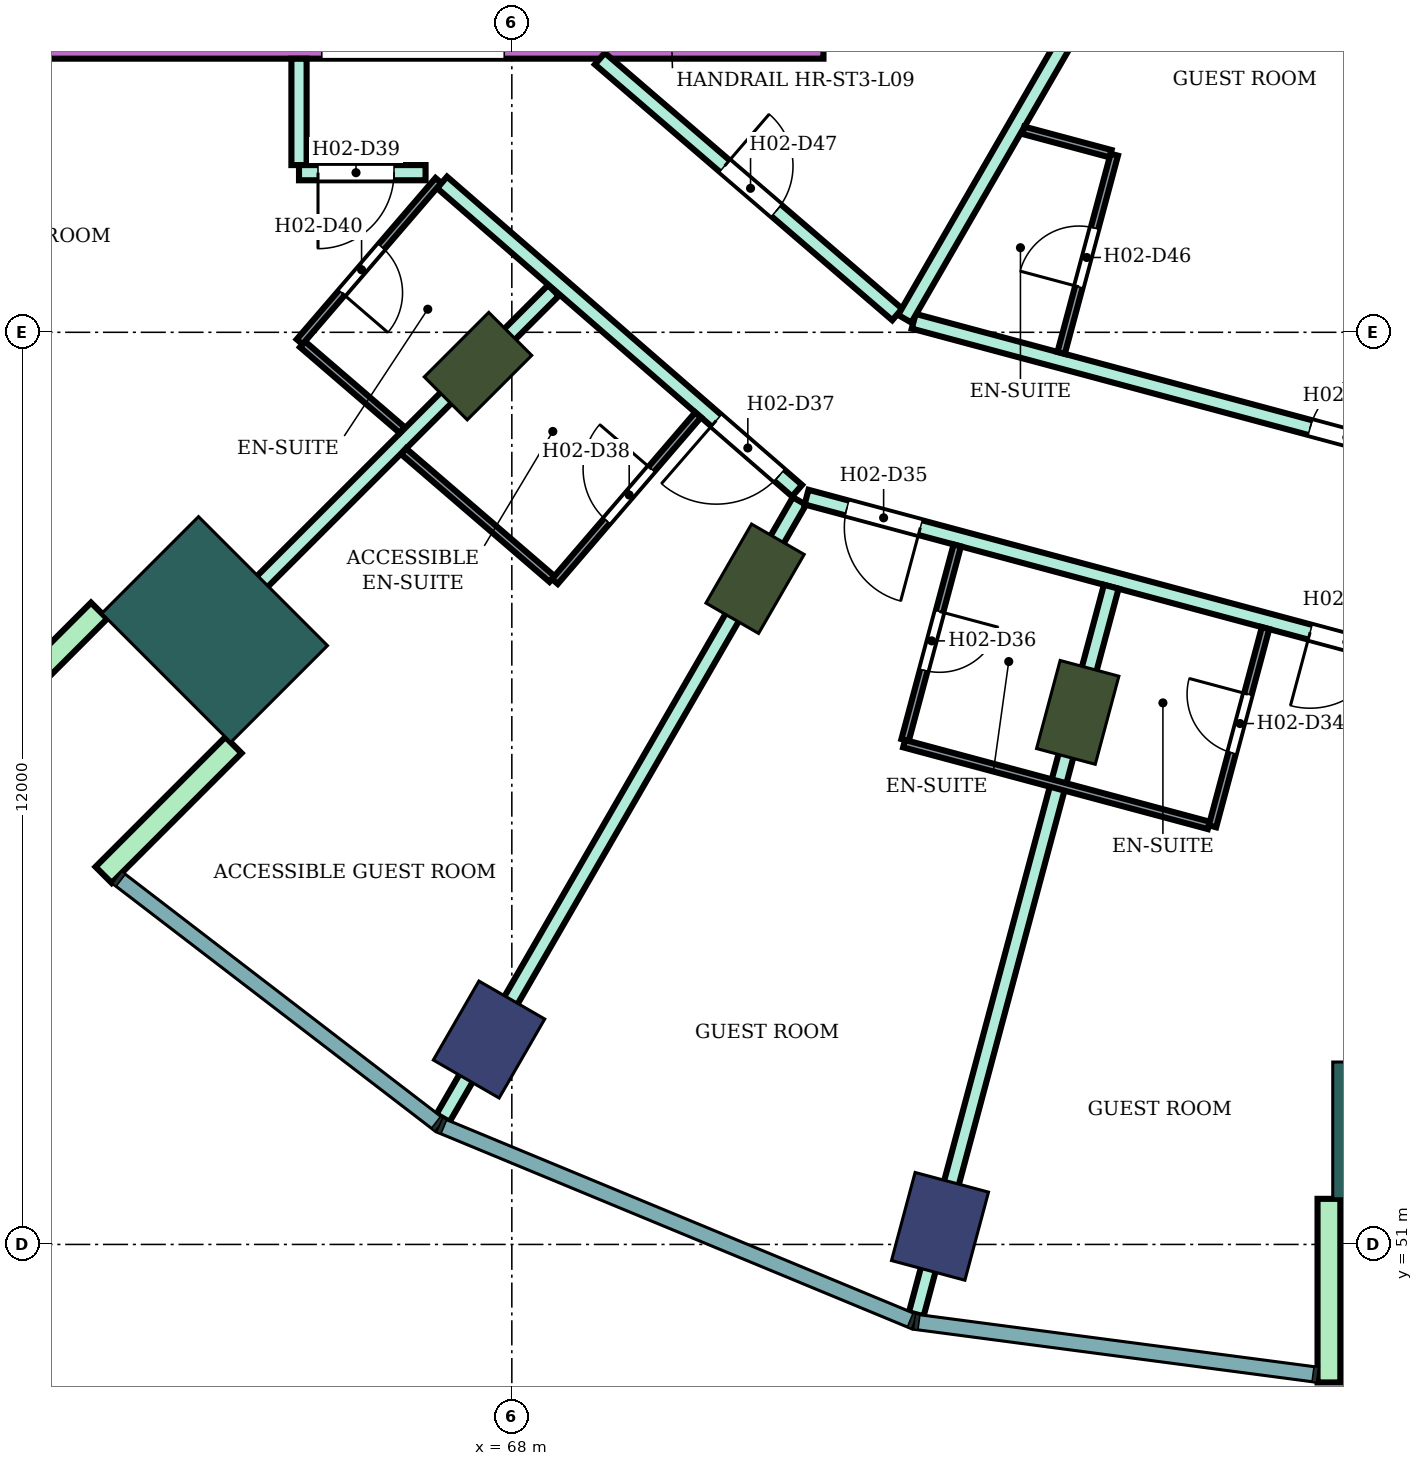
"""IFC4 building model, lengths in metres.
Left out: names, types, materials, properties, quantities, classifications, styles, units other than length and angle.
Written with IfcOpenShell. Run it as: python <this file> out.ifc"""

import sys

from ifc_helpers import new_model, si_unit, direction, frame, frame_2d, origin, origin_2d, place, context, subcontext, project, spatial, rectangle, extrude, element, fill, save


model = new_model("IFC4")
c1 = context("Model", 3, precision=1e-05, world=origin(), true_north=direction((0.0, 1.0)))
c2 = subcontext(c1, "Body", "Model", "MODEL_VIEW")
j1 = project(units=[si_unit("LENGTHUNIT", "METRE"), si_unit("PLANEANGLEUNIT", "RADIAN")], contexts=[c1])
p1 = place(None, origin())
s1 = spatial("IfcSite", under=j1, at=p1, CompositionType="ELEMENT")
p2 = place(p1, origin())
s2 = spatial("IfcBuilding", under=s1, at=p2, CompositionType="ELEMENT")
p3 = place(p2, frame((0.0, 0.0, 44.0)))
s3 = spatial("IfcBuildingStorey", under=s2, at=p3, CompositionType="ELEMENT", Elevation=44.0)
for number, where, z_axis, x_axis in (
    (1, (67.7, 53.696, 0.0), (0.0, 0.0, 1.0), (-0.5, -0.866, 0.0)),
    (2, (73.633, 51.238, 0.0), (0.0, 0.0, 1.0), (-0.259, -0.966, 0.0)),
):
    element("IfcColumn", number, at=place(p3, frame(where, z_axis=z_axis, x_axis=x_axis)), inside=s3, PredefinedType="COLUMN", context=c2, shape_type="SweptSolid", body=[
        extrude(rectangle(XDim=1.2, YDim=1.0, at=origin_2d()), origin(), (0.0, 0.0, 1.0), 3.8),
    ])
for number, where, z_axis, x_axis in (
    (3, (67.555, 62.555, 0.0), (0.0, 0.0, 1.0), (-0.707, -0.707, 0.0)),
    (4, (71.2, 59.758, 0.0), (0.0, 0.0, 1.0), (-0.5, -0.866, 0.0)),
    (5, (75.445, 58.0, 0.0), (0.0, 0.0, 1.0), (-0.259, -0.966, 0.0)),
):
    element("IfcColumn", number, at=place(p3, frame(where, z_axis=z_axis, x_axis=x_axis)), inside=s3, PredefinedType="COLUMN", context=c2, shape_type="SweptSolid", body=[
        extrude(rectangle(XDim=1.2, YDim=0.8, at=origin_2d()), origin(), (0.0, 0.0, 1.0), 3.8),
    ])
for number, where, z_axis, x_axis in (
    (6, (64.09, 59.09, 0.0), (0.0, 0.0, 1.0), (-0.707, -0.707, 0.0)),
    (7, (80.0, 52.5, 0.0), (0.0, 0.0, 1.0), (0.0, -1.0, 0.0)),
):
    element("IfcColumn", number, at=place(p3, frame(where, z_axis=z_axis, x_axis=x_axis)), inside=s3, PredefinedType="COLUMN", context=c2, shape_type="SweptSolid", body=[
        extrude(rectangle(XDim=1.8, YDim=2.4, at=origin_2d()), origin(), (0.0, 0.0, 1.0), 3.8),
    ])
p4 = place(p3, frame((72.1, 67.0, 0.0), z_axis=(0.0, 0.0, 1.0), x_axis=(-1.0, 0.0, 0.0)))
e8 = element("IfcWall", 8, at=p4, inside=s3, PredefinedType="SHEAR", context=c2, shape_type="SweptSolid", body=[
    extrude(rectangle(XDim=14.7, YDim=0.8, at=frame_2d((7.35, 0.0))), origin(), (0.0, 0.0, 1.0), 3.48),
])
p5 = place(p4, frame((4.2, 0.0, 0.0)))
e9 = element("IfcOpeningElement", 9, at=p5, cuts=e8, PredefinedType="OPENING", context=c2, shape_type="SweptSolid", body=[
    extrude(rectangle(XDim=2.4, YDim=2.4, at=frame_2d((1.2, 1.2))), frame((0.0, 0.41, 0.0), z_axis=(0.0, -1.0, 0.0), x_axis=(1.0, 0.0, 0.0)), (0.0, 0.0, 1.0), 0.82),
])
for number, where, z_axis, x_axis in (
    (10, (62.57, 59.338, 0.0), (0.0, 0.0, 1.0), (-0.707, -0.707, 0.0)),
    (11, (64.338, 57.57, 0.0), (0.0, 0.0, 1.0), (-0.707, -0.707, 0.0)),
    (12, (78.75, 51.6, 0.0), (0.0, 0.0, 1.0), (0.0, -1.0, 0.0)),
):
    element("IfcWall", number, at=place(p3, frame(where, z_axis=z_axis, x_axis=x_axis)), inside=s3, PredefinedType="NOTDEFINED", context=c2, shape_type="SweptSolid", body=[
        extrude(rectangle(XDim=2.416, YDim=0.3, at=frame_2d((1.208, 0.0))), origin(), (0.0, 0.0, 1.0), 3.8),
    ])
p6 = place(p3, frame((63.594, 58.598, 0.0), z_axis=(0.0, 0.0, 1.0), x_axis=(0.707228748718, 0.706984792613, 0.0)))
e13 = element("IfcWall", 13, at=p6, inside=s3, PredefinedType="PARTITIONING", context=c2, shape_type="SweptSolid", body=[
    extrude(rectangle(XDim=7.005, YDim=0.2, at=frame_2d((3.503, 0.0))), origin(), (0.0, 0.0, 1.0), 3.35),
])
p7 = place(p3, frame((65.2, 65.2, 0.0), z_axis=(0.0, 0.0, 1.0), x_axis=(0.0, 1.0, 0.0)))
e14 = element("IfcWall", 14, at=p7, inside=s3, PredefinedType="PARTITIONING", context=c2, shape_type="SweptSolid", body=[
    extrude(rectangle(XDim=1.399, YDim=0.2, at=frame_2d((0.7, 0.0))), origin(), (0.0, 0.0, 1.0), 3.35),
])
p8 = place(p3, frame((65.2, 65.1, 0.0), z_axis=(0.0, 0.0, 1.0), x_axis=(1.0, 0.0, 0.0)))
e15 = element("IfcWall", 15, at=p8, inside=s3, PredefinedType="PARTITIONING", context=c2, shape_type="SweptSolid", body=[
    extrude(rectangle(XDim=1.665, YDim=0.2, at=frame_2d((0.833, 0.0))), origin(), (0.0, 0.0, 1.0), 3.35),
])
p9 = place(p8, frame((0.25, 0.0, 0.0)))
e16 = element("IfcOpeningElement", 16, at=p9, cuts=e15, PredefinedType="OPENING", context=c2, shape_type="SweptSolid", body=[
    extrude(rectangle(XDim=1.0, YDim=2.1, at=frame_2d((0.5, 1.05))), frame((0.0, 0.11, 0.0), z_axis=(0.0, -1.0, 0.0), x_axis=(1.0, 0.0, 0.0)), (0.0, 0.0, 1.0), 0.22),
])
p10 = place(p3, frame((67.082, 64.972, 0.0), z_axis=(0.0, 0.0, 1.0), x_axis=(0.755033632617, -0.655686063309, 0.0)))
e17 = element("IfcWall", 17, at=p10, inside=s3, PredefinedType="PARTITIONING", context=c2, shape_type="SweptSolid", body=[
    extrude(rectangle(XDim=6.185, YDim=0.2, at=frame_2d((3.093, 0.0))), origin(), (0.0, 0.0, 1.0), 3.35),
])
p11 = place(p10, frame((4.778, 0.0, 0.0)))
e18 = element("IfcOpeningElement", 18, at=p11, cuts=e17, PredefinedType="OPENING", context=c2, shape_type="SweptSolid", body=[
    extrude(rectangle(XDim=1.1, YDim=2.1, at=frame_2d((0.55, 1.05))), frame((0.0, 0.11, 0.0), z_axis=(0.0, -1.0, 0.0), x_axis=(1.0, 0.0, 0.0)), (0.0, 0.0, 1.0), 0.22),
])
p12 = place(p3, frame((67.094, 52.663, 0.0), z_axis=(0.0, 0.0, 1.0), x_axis=(0.500216854217, 0.865900166738, 0.0)))
e19 = element("IfcWall", 19, at=p12, inside=s3, PredefinedType="PARTITIONING", context=c2, shape_type="SweptSolid", body=[
    extrude(rectangle(XDim=9.375, YDim=0.2, at=frame_2d((4.688, 0.0))), origin(), (0.0, 0.0, 1.0), 3.35),
])
p13 = place(p3, frame((69.158, 66.6, 0.0), z_axis=(0.0, 0.0, 1.0), x_axis=(0.758063092745, -0.652181222835, 0.0)))
e20 = element("IfcWall", 20, at=p13, inside=s3, PredefinedType="PARTITIONING", context=c2, shape_type="SweptSolid", body=[
    extrude(rectangle(XDim=5.16, YDim=0.2, at=frame_2d((2.58, 0.0))), origin(), (0.0, 0.0, 1.0), 3.35),
])
p14 = place(p13, frame((2.165, 0.0, 0.0)))
e21 = element("IfcOpeningElement", 21, at=p14, cuts=e20, PredefinedType="OPENING", context=c2, shape_type="SweptSolid", body=[
    extrude(rectangle(XDim=0.9, YDim=2.1, at=frame_2d((0.45, 1.05))), frame((0.0, 0.11, 0.0), z_axis=(0.0, -1.0, 0.0), x_axis=(1.0, 0.0, 0.0)), (0.0, 0.0, 1.0), 0.22),
])
p15 = place(p3, frame((71.877, 60.832, 0.0), z_axis=(0.0, 0.0, 1.0), x_axis=(0.965852509869, -0.259092510851, 0.0)))
e22 = element("IfcWall", 22, at=p15, inside=s3, PredefinedType="PARTITIONING", context=c2, shape_type="SweptSolid", body=[
    extrude(rectangle(XDim=8.32, YDim=0.2, at=frame_2d((4.16, 0.0))), origin(), (0.0, 0.0, 1.0), 3.35),
])
p16 = place(p15, frame((6.86, 0.0, 0.0)))
e23 = element("IfcOpeningElement", 23, at=p16, cuts=e22, PredefinedType="OPENING", context=c2, shape_type="SweptSolid", body=[
    extrude(rectangle(XDim=1.0, YDim=2.1, at=frame_2d((0.5, 1.05))), frame((0.0, 0.11, 0.0), z_axis=(0.0, -1.0, 0.0), x_axis=(1.0, 0.0, 0.0)), (0.0, 0.0, 1.0), 0.22),
])
p17 = place(p15, frame((0.55, 0.0, 0.0)))
e24 = element("IfcOpeningElement", 24, at=p17, cuts=e22, PredefinedType="OPENING", context=c2, shape_type="SweptSolid", body=[
    extrude(rectangle(XDim=1.0, YDim=2.1, at=frame_2d((0.5, 1.05))), frame((0.0, 0.11, 0.0), z_axis=(0.0, -1.0, 0.0), x_axis=(1.0, 0.0, 0.0)), (0.0, 0.0, 1.0), 0.22),
])
p18 = place(p3, frame((73.287, 63.145, 0.0), z_axis=(0.0, 0.0, 1.0), x_axis=(0.965854200194, -0.259086209526, 0.0)))
e25 = element("IfcWall", 25, at=p18, inside=s3, PredefinedType="PARTITIONING", context=c2, shape_type="SweptSolid", body=[
    extrude(rectangle(XDim=6.82, YDim=0.2, at=frame_2d((3.41, 0.0))), origin(), (0.0, 0.0, 1.0), 3.35),
])
p19 = place(p18, frame((5.4, 0.0, 0.0)))
e26 = element("IfcOpeningElement", 26, at=p19, cuts=e25, PredefinedType="OPENING", context=c2, shape_type="SweptSolid", body=[
    extrude(rectangle(XDim=1.0, YDim=2.1, at=frame_2d((0.5, 1.05))), frame((0.0, 0.11, 0.0), z_axis=(0.0, -1.0, 0.0), x_axis=(1.0, 0.0, 0.0)), (0.0, 0.0, 1.0), 0.22),
])
p20 = place(p3, frame((73.169, 63.178, 0.0), z_axis=(0.0, 0.0, 1.0), x_axis=(0.50020860964, 0.865904929448, 0.0)))
e27 = element("IfcWall", 27, at=p20, inside=s3, PredefinedType="PARTITIONING", context=c2, shape_type="SweptSolid", body=[
    extrude(rectangle(XDim=5.955, YDim=0.2, at=frame_2d((2.978, 0.0))), origin(), (0.0, 0.0, 1.0), 3.35),
])
p21 = place(p3, frame((73.321, 50.081, 0.0), z_axis=(0.0, 0.0, 1.0), x_axis=(0.25891218439, 0.965900864879, 0.0)))
e28 = element("IfcWall", 28, at=p21, inside=s3, PredefinedType="PARTITIONING", context=c2, shape_type="SweptSolid", body=[
    extrude(rectangle(XDim=9.909, YDim=0.2, at=frame_2d((4.955, 0.0))), origin(), (0.0, 0.0, 1.0), 3.35),
])
p22 = place(p3, frame((65.246, 62.842, 0.0), z_axis=(0.0, 0.0, 1.0), x_axis=(0.758030338995, -0.652219292234, 0.0)))
e29 = element("IfcWall", 29, at=p22, inside=s3, PredefinedType="PARTITIONING", context=c2, shape_type="SweptSolid", body=[
    extrude(rectangle(XDim=1.73, YDim=0.1, at=frame_2d((0.865, 0.0))), origin(), (0.0, 0.0, 1.0), 3.35),
])
p23 = place(p3, frame((65.208, 62.875, 0.0), z_axis=(0.0, 0.0, 1.0), x_axis=(0.65205430601, 0.758172264076, 0.0)))
e30 = element("IfcWall", 30, at=p23, inside=s3, PredefinedType="PARTITIONING", context=c2, shape_type="SweptSolid", body=[
    extrude(rectangle(XDim=2.8, YDim=0.1, at=frame_2d((1.4, 0.0))), origin(), (0.0, 0.0, 1.0), 3.35),
])
p24 = place(p23, frame((0.85, 0.0, 0.0)))
e31 = element("IfcOpeningElement", 31, at=p24, cuts=e30, PredefinedType="OPENING", context=c2, shape_type="SweptSolid", body=[
    extrude(rectangle(XDim=0.8, YDim=2.1, at=frame_2d((0.4, 1.05))), frame((0.0, 0.06, 0.0), z_axis=(0.0, -1.0, 0.0), x_axis=(1.0, 0.0, 0.0)), (0.0, 0.0, 1.0), 0.12),
])
p25 = place(p3, frame((66.576, 61.435, 0.0), z_axis=(0.0, 0.0, 1.0), x_axis=(0.757970550281, -0.652288774169, 0.0)))
e32 = element("IfcWall", 32, at=p25, inside=s3, PredefinedType="PARTITIONING", context=c2, shape_type="SweptSolid", body=[
    extrude(rectangle(XDim=2.576, YDim=0.1, at=frame_2d((1.288, 0.0))), origin(), (0.0, 0.0, 1.0), 3.35),
])
p26 = place(p3, frame((68.566, 59.722, 0.0), z_axis=(0.0, 0.0, 1.0), x_axis=(0.65193146671, 0.758277892803, 0.0)))
e33 = element("IfcWall", 33, at=p26, inside=s3, PredefinedType="PARTITIONING", context=c2, shape_type="SweptSolid", body=[
    extrude(rectangle(XDim=2.89, YDim=0.1, at=frame_2d((1.445, 0.0))), origin(), (0.0, 0.0, 1.0), 3.35),
])
p27 = place(p26, frame((1.05, 0.0, 0.0)))
e34 = element("IfcOpeningElement", 34, at=p27, cuts=e33, PredefinedType="OPENING", context=c2, shape_type="SweptSolid", body=[
    extrude(rectangle(XDim=0.9, YDim=2.1, at=frame_2d((0.45, 1.05))), frame((0.0, 0.06, 0.0), z_axis=(0.0, -1.0, 0.0), x_axis=(1.0, 0.0, 0.0)), (0.0, 0.0, 1.0), 0.12),
])
p28 = place(p3, frame((73.174, 57.636, 0.0), z_axis=(0.0, 0.0, 1.0), x_axis=(0.258952498977, 0.96589005755, 0.0)))
e35 = element("IfcWall", 35, at=p28, inside=s3, PredefinedType="PARTITIONING", context=c2, shape_type="SweptSolid", body=[
    extrude(rectangle(XDim=2.65, YDim=0.1, at=frame_2d((1.325, 0.0))), origin(), (0.0, 0.0, 1.0), 3.35),
])
p29 = place(p28, frame((0.95, 0.0, 0.0)))
e36 = element("IfcOpeningElement", 36, at=p29, cuts=e35, PredefinedType="OPENING", context=c2, shape_type="SweptSolid", body=[
    extrude(rectangle(XDim=0.8, YDim=2.1, at=frame_2d((0.4, 1.05))), frame((0.0, 0.06, 0.0), z_axis=(0.0, -1.0, 0.0), x_axis=(1.0, 0.0, 0.0)), (0.0, 0.0, 1.0), 0.12),
])
p30 = place(p3, frame((73.161, 57.588, 0.0), z_axis=(0.0, 0.0, 1.0), x_axis=(0.965858994467, -0.259068336173, 0.0)))
e37 = element("IfcWall", 37, at=p30, inside=s3, PredefinedType="PARTITIONING", context=c2, shape_type="SweptSolid", body=[
    extrude(rectangle(XDim=4.15, YDim=0.1, at=frame_2d((2.075, 0.0))), origin(), (0.0, 0.0, 1.0), 3.35),
])
p31 = place(p3, frame((74.729, 65.657, 0.0), z_axis=(0.0, 0.0, 1.0), x_axis=(0.965948051503, -0.258736085224, 0.0)))
e38 = element("IfcWall", 38, at=p31, inside=s3, PredefinedType="PARTITIONING", context=c2, shape_type="SweptSolid", body=[
    extrude(rectangle(XDim=1.189, YDim=0.1, at=frame_2d((0.594, 0.0))), origin(), (0.0, 0.0, 1.0), 3.35),
])
p32 = place(p3, frame((75.227, 62.729, 0.0), z_axis=(0.0, 0.0, 1.0), x_axis=(0.258945475746, 0.965891940432, 0.0)))
e39 = element("IfcWall", 39, at=p32, inside=s3, PredefinedType="PARTITIONING", context=c2, shape_type="SweptSolid", body=[
    extrude(rectangle(XDim=2.7, YDim=0.1, at=frame_2d((1.35, 0.0))), origin(), (0.0, 0.0, 1.0), 3.35),
])
p33 = place(p32, frame((0.9, 0.0, 0.0)))
e40 = element("IfcOpeningElement", 40, at=p33, cuts=e39, PredefinedType="OPENING", context=c2, shape_type="SweptSolid", body=[
    extrude(rectangle(XDim=0.8, YDim=2.1, at=frame_2d((0.4, 1.05))), frame((0.0, 0.06, 0.0), z_axis=(0.0, -1.0, 0.0), x_axis=(1.0, 0.0, 0.0)), (0.0, 0.0, 1.0), 0.12),
])
p34 = place(p3, frame((77.218, 56.501, 0.0), z_axis=(0.0, 0.0, 1.0), x_axis=(0.258591408257, 0.965986792651, 0.0)))
e41 = element("IfcWall", 41, at=p34, inside=s3, PredefinedType="PARTITIONING", context=c2, shape_type="SweptSolid", body=[
    extrude(rectangle(XDim=2.699, YDim=0.1, at=frame_2d((1.35, 0.0))), origin(), (0.0, 0.0, 1.0), 3.35),
])
p35 = place(p34, frame((1.0, 0.0, 0.0)))
e42 = element("IfcOpeningElement", 42, at=p35, cuts=e41, PredefinedType="OPENING", context=c2, shape_type="SweptSolid", body=[
    extrude(rectangle(XDim=0.8, YDim=2.1, at=frame_2d((0.4, 1.05))), frame((0.0, 0.06, 0.0), z_axis=(0.0, -1.0, 0.0), x_axis=(1.0, 0.0, 0.0)), (0.0, 0.0, 1.0), 0.12),
])
p36 = place(p16, frame((1.0, 0.0, 0.0), z_axis=(0.0, 0.0, 1.0), x_axis=(-1.0, 0.0, 0.0)))
e43 = element("IfcDoor", 43, at=p36, inside=s3, OperationType="SINGLE_SWING_RIGHT", PredefinedType="DOOR", context=c2, shape_type="SweptSolid", body=[
    extrude(rectangle(XDim=1.0, YDim=2.1, at=frame_2d((0.5, 1.05))), frame((0.0, 0.025, 0.0), z_axis=(0.0, -1.0, 0.0), x_axis=(1.0, 0.0, 0.0)), (0.0, 0.0, 1.0), 0.05),
])
fill(e23, e43)
p37 = place(p35, origin())
e44 = element("IfcDoor", 44, at=p37, inside=s3, OperationType="SINGLE_SWING_RIGHT", PredefinedType="DOOR", context=c2, shape_type="SweptSolid", body=[
    extrude(rectangle(XDim=0.8, YDim=2.1, at=frame_2d((0.4, 1.05))), frame((0.0, 0.025, 0.0), z_axis=(0.0, -1.0, 0.0), x_axis=(1.0, 0.0, 0.0)), (0.0, 0.0, 1.0), 0.05),
])
fill(e42, e44)
p38 = place(p17, frame((1.0, 0.0, 0.0), z_axis=(0.0, 0.0, 1.0), x_axis=(-1.0, 0.0, 0.0)))
e45 = element("IfcDoor", 45, at=p38, inside=s3, OperationType="SINGLE_SWING_LEFT", PredefinedType="DOOR", context=c2, shape_type="SweptSolid", body=[
    extrude(rectangle(XDim=1.0, YDim=2.1, at=frame_2d((0.5, 1.05))), frame((0.0, 0.025, 0.0), z_axis=(0.0, -1.0, 0.0), x_axis=(1.0, 0.0, 0.0)), (0.0, 0.0, 1.0), 0.05),
])
fill(e24, e45)
p39 = place(p29, frame((0.8, 0.0, 0.0), z_axis=(0.0, 0.0, 1.0), x_axis=(-1.0, 0.0, 0.0)))
e46 = element("IfcDoor", 46, at=p39, inside=s3, OperationType="SINGLE_SWING_LEFT", PredefinedType="DOOR", context=c2, shape_type="SweptSolid", body=[
    extrude(rectangle(XDim=0.8, YDim=2.1, at=frame_2d((0.4, 1.05))), frame((0.0, 0.025, 0.0), z_axis=(0.0, -1.0, 0.0), x_axis=(1.0, 0.0, 0.0)), (0.0, 0.0, 1.0), 0.05),
])
fill(e36, e46)
p40 = place(p11, frame((1.1, 0.0, 0.0), z_axis=(0.0, 0.0, 1.0), x_axis=(-1.0, 0.0, 0.0)))
e47 = element("IfcDoor", 47, at=p40, inside=s3, OperationType="SINGLE_SWING_RIGHT", PredefinedType="DOOR", context=c2, shape_type="SweptSolid", body=[
    extrude(rectangle(XDim=1.1, YDim=2.1, at=frame_2d((0.55, 1.05))), frame((0.0, 0.025, 0.0), z_axis=(0.0, -1.0, 0.0), x_axis=(1.0, 0.0, 0.0)), (0.0, 0.0, 1.0), 0.05),
])
fill(e18, e47)
p41 = place(p27, origin())
e48 = element("IfcDoor", 48, at=p41, inside=s3, OperationType="SINGLE_SWING_RIGHT", PredefinedType="DOOR", context=c2, shape_type="SweptSolid", body=[
    extrude(rectangle(XDim=0.9, YDim=2.1, at=frame_2d((0.45, 1.05))), frame((0.0, 0.025, 0.0), z_axis=(0.0, -1.0, 0.0), x_axis=(1.0, 0.0, 0.0)), (0.0, 0.0, 1.0), 0.05),
])
fill(e34, e48)
p42 = place(p9, frame((1.0, 0.0, 0.0), z_axis=(0.0, 0.0, 1.0), x_axis=(-1.0, 0.0, 0.0)))
e49 = element("IfcDoor", 49, at=p42, inside=s3, OperationType="SINGLE_SWING_RIGHT", PredefinedType="DOOR", context=c2, shape_type="SweptSolid", body=[
    extrude(rectangle(XDim=1.0, YDim=2.1, at=frame_2d((0.5, 1.05))), frame((0.0, 0.025, 0.0), z_axis=(0.0, -1.0, 0.0), x_axis=(1.0, 0.0, 0.0)), (0.0, 0.0, 1.0), 0.05),
])
fill(e16, e49)
p43 = place(p24, frame((0.8, 0.0, 0.0), z_axis=(0.0, 0.0, 1.0), x_axis=(-1.0, 0.0, 0.0)))
e50 = element("IfcDoor", 50, at=p43, inside=s3, OperationType="SINGLE_SWING_RIGHT", PredefinedType="DOOR", context=c2, shape_type="SweptSolid", body=[
    extrude(rectangle(XDim=0.8, YDim=2.1, at=frame_2d((0.4, 1.05))), frame((0.0, 0.025, 0.0), z_axis=(0.0, -1.0, 0.0), x_axis=(1.0, 0.0, 0.0)), (0.0, 0.0, 1.0), 0.05),
])
fill(e31, e50)
p44 = place(p19, origin())
e51 = element("IfcDoor", 51, at=p44, inside=s3, OperationType="SINGLE_SWING_RIGHT", PredefinedType="DOOR", context=c2, shape_type="SweptSolid", body=[
    extrude(rectangle(XDim=1.0, YDim=2.1, at=frame_2d((0.5, 1.05))), frame((0.0, 0.025, 0.0), z_axis=(0.0, -1.0, 0.0), x_axis=(1.0, 0.0, 0.0)), (0.0, 0.0, 1.0), 0.05),
])
fill(e26, e51)
p45 = place(p33, origin())
e52 = element("IfcDoor", 52, at=p45, inside=s3, OperationType="SINGLE_SWING_LEFT", PredefinedType="DOOR", context=c2, shape_type="SweptSolid", body=[
    extrude(rectangle(XDim=0.8, YDim=2.1, at=frame_2d((0.4, 1.05))), frame((0.0, 0.025, 0.0), z_axis=(0.0, -1.0, 0.0), x_axis=(1.0, 0.0, 0.0)), (0.0, 0.0, 1.0), 0.05),
])
fill(e40, e52)
p46 = place(p14, origin())
e53 = element("IfcDoor", 53, at=p46, inside=s3, OperationType="SINGLE_SWING_LEFT", PredefinedType="DOOR", context=c2, shape_type="SweptSolid", body=[
    extrude(rectangle(XDim=0.9, YDim=2.1, at=frame_2d((0.45, 1.05))), frame((0.0, 0.025, 0.0), z_axis=(0.0, -1.0, 0.0), x_axis=(1.0, 0.0, 0.0)), (0.0, 0.0, 1.0), 0.05),
])
fill(e21, e53)
save(model, sys.argv[1])
